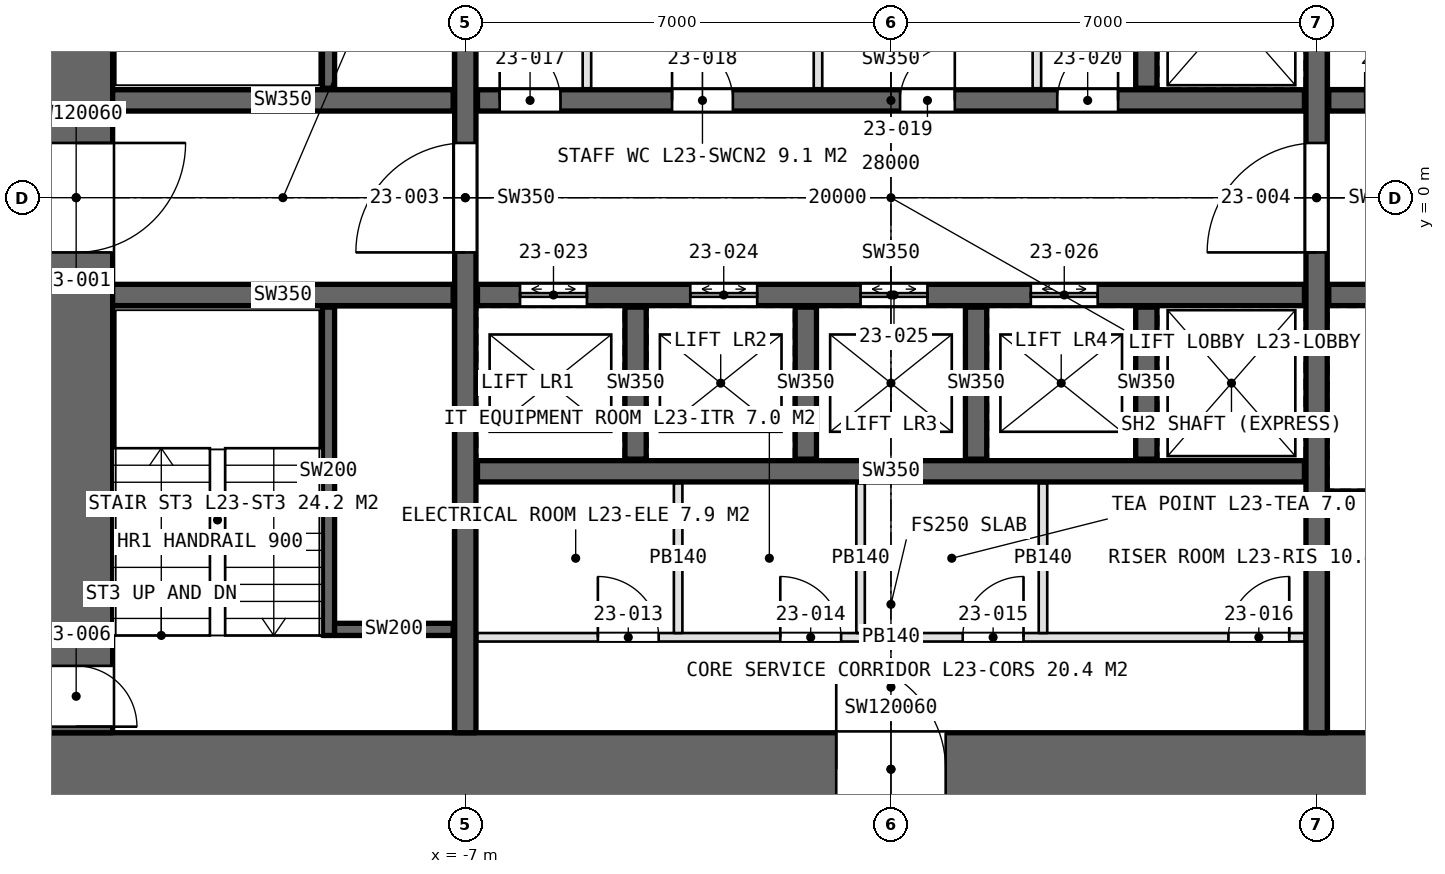
"""IFC4 building model, lengths in metres.
Left out: names, types, materials, properties, quantities, classifications, styles, units other than length and angle.
Written with IfcOpenShell. Run it as: python <this file> out.ifc"""

import sys

from ifc_helpers import new_model, si_unit, direction, frame, frame_2d, origin, place, context, subcontext, project, spatial, rectangle, extrude, element, fill, save


model = new_model("IFC4")
c1 = context("Model", 3, precision=1e-05, world=origin(), true_north=direction((0.0, 1.0)))
c2 = subcontext(c1, "Body", "Model", "MODEL_VIEW")
j1 = project(units=[si_unit("LENGTHUNIT", "METRE"), si_unit("PLANEANGLEUNIT", "RADIAN")], contexts=[c1])
p1 = place(None, origin())
s1 = spatial("IfcSite", under=j1, at=p1, CompositionType="ELEMENT")
p2 = place(p1, origin())
s2 = spatial("IfcBuilding", under=s1, at=p2, CompositionType="ELEMENT")
p3 = place(p2, frame((0.0, 0.0, 113.4)))
s3 = spatial("IfcBuildingStorey", under=s2, at=p3, CompositionType="ELEMENT", Elevation=113.4)
p4 = place(p3, frame((-14.0, -9.4, 0.0), z_axis=(0.0, 0.0, 1.0), x_axis=(1.0, 0.0, 0.0)))
e1 = element("IfcWall", 1, at=p4, inside=s3, PredefinedType="SHEAR", context=c2, shape_type="SweptSolid", body=[
    extrude(rectangle(XDim=28.0, YDim=1.2, at=frame_2d((14.0, 0.0))), origin(), (0.0, 0.0, 1.0), 4.2),
])
p5 = place(p4, frame((13.1, 0.0, 0.0)))
e2 = element("IfcOpeningElement", 2, at=p5, cuts=e1, PredefinedType="OPENING", context=c2, shape_type="SweptSolid", body=[
    extrude(rectangle(XDim=1.8, YDim=2.4, at=frame_2d((0.9, 1.2))), frame((0.0, 0.61, 0.0), z_axis=(0.0, -1.0, 0.0), x_axis=(1.0, 0.0, 0.0)), (0.0, 0.0, 1.0), 1.22),
])
p6 = place(p4, frame((22.9, 0.0, 0.0)))
e3 = element("IfcOpeningElement", 3, at=p6, cuts=e1, PredefinedType="OPENING", context=c2, shape_type="SweptSolid", body=[
    extrude(rectangle(XDim=2.2, YDim=2.7, at=frame_2d((1.1, 1.35))), frame((0.0, 0.61, 0.0), z_axis=(0.0, -1.0, 0.0), x_axis=(1.0, 0.0, 0.0)), (0.0, 0.0, 1.0), 1.22),
])
p7 = place(p3, frame((-13.4, 8.8, 0.0), z_axis=(0.0, 0.0, 1.0), x_axis=(0.0, -1.0, 0.0)))
e4 = element("IfcWall", 4, at=p7, inside=s3, PredefinedType="SHEAR", context=c2, shape_type="SweptSolid", body=[
    extrude(rectangle(XDim=17.6, YDim=1.2, at=frame_2d((8.8, 0.0))), origin(), (0.0, 0.0, 1.0), 4.2),
])
p8 = place(p7, frame((7.9, 0.0, 0.0)))
e5 = element("IfcOpeningElement", 5, at=p8, cuts=e4, PredefinedType="OPENING", context=c2, shape_type="SweptSolid", body=[
    extrude(rectangle(XDim=1.8, YDim=2.4, at=frame_2d((0.9, 1.2))), frame((0.0, 0.61, 0.0), z_axis=(0.0, -1.0, 0.0), x_axis=(1.0, 0.0, 0.0)), (0.0, 0.0, 1.0), 1.22),
])
p9 = place(p7, frame((16.5, 0.0, 0.0)))
e6 = element("IfcOpeningElement", 6, at=p9, cuts=e4, PredefinedType="OPENING", context=c2, shape_type="SweptSolid", body=[
    extrude(rectangle(XDim=1.0, YDim=2.4, at=frame_2d((0.5, 1.2))), frame((0.0, 0.61, 0.0), z_axis=(0.0, -1.0, 0.0), x_axis=(1.0, 0.0, 0.0)), (0.0, 0.0, 1.0), 1.22),
])
p10 = place(p3, frame((-7.0, -8.8, 0.0), z_axis=(0.0, 0.0, 1.0), x_axis=(0.0, 1.0, 0.0)))
e7 = element("IfcWall", 7, at=p10, inside=s3, PredefinedType="SHEAR", context=c2, shape_type="SweptSolid", body=[
    extrude(rectangle(XDim=17.6, YDim=0.35, at=frame_2d((8.8, 0.0))), origin(), (0.0, 0.0, 1.0), 4.2),
])
p11 = place(p10, frame((7.9, 0.0, 0.0)))
e8 = element("IfcOpeningElement", 8, at=p11, cuts=e7, PredefinedType="OPENING", context=c2, shape_type="SweptSolid", body=[
    extrude(rectangle(XDim=1.8, YDim=2.4, at=frame_2d((0.9, 1.2))), frame((0.0, 0.185, 0.0), z_axis=(0.0, -1.0, 0.0), x_axis=(1.0, 0.0, 0.0)), (0.0, 0.0, 1.0), 0.37),
])
p12 = place(p3, frame((7.0, -8.8, 0.0), z_axis=(0.0, 0.0, 1.0), x_axis=(0.0, 1.0, 0.0)))
e9 = element("IfcWall", 9, at=p12, inside=s3, PredefinedType="SHEAR", context=c2, shape_type="SweptSolid", body=[
    extrude(rectangle(XDim=17.6, YDim=0.35, at=frame_2d((8.8, 0.0))), origin(), (0.0, 0.0, 1.0), 4.2),
])
p13 = place(p12, frame((7.9, 0.0, 0.0)))
e10 = element("IfcOpeningElement", 10, at=p13, cuts=e9, PredefinedType="OPENING", context=c2, shape_type="SweptSolid", body=[
    extrude(rectangle(XDim=1.8, YDim=2.4, at=frame_2d((0.9, 1.2))), frame((0.0, 0.185, 0.0), z_axis=(0.0, -1.0, 0.0), x_axis=(1.0, 0.0, 0.0)), (0.0, 0.0, 1.0), 0.37),
])
p14 = place(p3, frame((-6.8, 1.6, 0.0), z_axis=(0.0, 0.0, 1.0), x_axis=(1.0, 0.0, 0.0)))
e11 = element("IfcWall", 11, at=p14, inside=s3, PredefinedType="SHEAR", context=c2, shape_type="SweptSolid", body=[
    extrude(rectangle(XDim=13.6, YDim=0.35, at=frame_2d((6.8, 0.0))), origin(), (0.0, 0.0, 1.0), 4.2),
])
p15 = place(p14, frame((0.365, 0.0, 0.0)))
e12 = element("IfcOpeningElement", 12, at=p15, cuts=e11, PredefinedType="OPENING", context=c2, shape_type="SweptSolid", body=[
    extrude(rectangle(XDim=1.0, YDim=2.4, at=frame_2d((0.5, 1.2))), frame((0.0, 0.185, 0.0), z_axis=(0.0, -1.0, 0.0), x_axis=(1.0, 0.0, 0.0)), (0.0, 0.0, 1.0), 0.37),
])
p16 = place(p14, frame((3.2, 0.0, 0.0)))
e13 = element("IfcOpeningElement", 13, at=p16, cuts=e11, PredefinedType="OPENING", context=c2, shape_type="SweptSolid", body=[
    extrude(rectangle(XDim=1.0, YDim=2.4, at=frame_2d((0.5, 1.2))), frame((0.0, 0.185, 0.0), z_axis=(0.0, -1.0, 0.0), x_axis=(1.0, 0.0, 0.0)), (0.0, 0.0, 1.0), 0.37),
])
p17 = place(p14, frame((6.95, 0.0, 0.0)))
e14 = element("IfcOpeningElement", 14, at=p17, cuts=e11, PredefinedType="OPENING", context=c2, shape_type="SweptSolid", body=[
    extrude(rectangle(XDim=0.9, YDim=2.4, at=frame_2d((0.45, 1.2))), frame((0.0, 0.185, 0.0), z_axis=(0.0, -1.0, 0.0), x_axis=(1.0, 0.0, 0.0)), (0.0, 0.0, 1.0), 0.37),
])
p18 = place(p14, frame((9.535, 0.0, 0.0)))
e15 = element("IfcOpeningElement", 15, at=p18, cuts=e11, PredefinedType="OPENING", context=c2, shape_type="SweptSolid", body=[
    extrude(rectangle(XDim=1.0, YDim=2.4, at=frame_2d((0.5, 1.2))), frame((0.0, 0.185, 0.0), z_axis=(0.0, -1.0, 0.0), x_axis=(1.0, 0.0, 0.0)), (0.0, 0.0, 1.0), 0.37),
])
p19 = place(p3, frame((-6.8, -1.6, 0.0), z_axis=(0.0, 0.0, 1.0), x_axis=(1.0, 0.0, 0.0)))
e16 = element("IfcWall", 16, at=p19, inside=s3, PredefinedType="SHEAR", context=c2, shape_type="SweptSolid", body=[
    extrude(rectangle(XDim=13.6, YDim=0.35, at=frame_2d((6.8, 0.0))), origin(), (0.0, 0.0, 1.0), 4.2),
])
p20 = place(p19, frame((0.7, 0.0, 0.0)))
e17 = element("IfcOpeningElement", 17, at=p20, cuts=e16, PredefinedType="OPENING", context=c2, shape_type="SweptSolid", body=[
    extrude(rectangle(XDim=1.1, YDim=2.4, at=frame_2d((0.55, 1.2))), frame((0.0, 0.185, 0.0), z_axis=(0.0, -1.0, 0.0), x_axis=(1.0, 0.0, 0.0)), (0.0, 0.0, 1.0), 0.37),
])
p21 = place(p19, frame((3.5, 0.0, 0.0)))
e18 = element("IfcOpeningElement", 18, at=p21, cuts=e16, PredefinedType="OPENING", context=c2, shape_type="SweptSolid", body=[
    extrude(rectangle(XDim=1.1, YDim=2.4, at=frame_2d((0.55, 1.2))), frame((0.0, 0.185, 0.0), z_axis=(0.0, -1.0, 0.0), x_axis=(1.0, 0.0, 0.0)), (0.0, 0.0, 1.0), 0.37),
])
p22 = place(p19, frame((6.3, 0.0, 0.0)))
e19 = element("IfcOpeningElement", 19, at=p22, cuts=e16, PredefinedType="OPENING", context=c2, shape_type="SweptSolid", body=[
    extrude(rectangle(XDim=1.1, YDim=2.4, at=frame_2d((0.55, 1.2))), frame((0.0, 0.185, 0.0), z_axis=(0.0, -1.0, 0.0), x_axis=(1.0, 0.0, 0.0)), (0.0, 0.0, 1.0), 0.37),
])
p23 = place(p19, frame((9.1, 0.0, 0.0)))
e20 = element("IfcOpeningElement", 20, at=p23, cuts=e16, PredefinedType="OPENING", context=c2, shape_type="SweptSolid", body=[
    extrude(rectangle(XDim=1.1, YDim=2.4, at=frame_2d((0.55, 1.2))), frame((0.0, 0.185, 0.0), z_axis=(0.0, -1.0, 0.0), x_axis=(1.0, 0.0, 0.0)), (0.0, 0.0, 1.0), 0.37),
])
p24 = place(p3, frame((-6.8, -4.5, 0.0), z_axis=(0.0, 0.0, 1.0), x_axis=(1.0, 0.0, 0.0)))
e21 = element("IfcWall", 21, at=p24, inside=s3, PredefinedType="SHEAR", context=c2, shape_type="SweptSolid", body=[
    extrude(rectangle(XDim=13.6, YDim=0.35, at=frame_2d((6.8, 0.0))), origin(), (0.0, 0.0, 1.0), 4.2),
])
for number, where, z_axis, x_axis in (
    (22, (-12.8, 1.6, 0.0), (0.0, 0.0, 1.0), (1.0, 0.0, 0.0)),
    (23, (-12.8, -1.6, 0.0), (0.0, 0.0, 1.0), (1.0, 0.0, 0.0)),
):
    element("IfcWall", number, at=place(p3, frame(where, z_axis=z_axis, x_axis=x_axis)), inside=s3, PredefinedType="SHEAR", context=c2, shape_type="SweptSolid", body=[
        extrude(rectangle(XDim=5.6, YDim=0.35, at=frame_2d((2.8, 0.0))), origin(), (0.0, 0.0, 1.0), 4.2),
    ])
p25 = place(p3, frame((7.2, 1.6, 0.0), z_axis=(0.0, 0.0, 1.0), x_axis=(1.0, 0.0, 0.0)))
e24 = element("IfcWall", 24, at=p25, inside=s3, PredefinedType="SHEAR", context=c2, shape_type="SweptSolid", body=[
    extrude(rectangle(XDim=5.6, YDim=0.35, at=frame_2d((2.8, 0.0))), origin(), (0.0, 0.0, 1.0), 4.2),
])
p26 = place(p25, frame((0.6, 0.0, 0.0)))
e25 = element("IfcOpeningElement", 25, at=p26, cuts=e24, PredefinedType="OPENING", context=c2, shape_type="SweptSolid", body=[
    extrude(rectangle(XDim=1.0, YDim=2.4, at=frame_2d((0.5, 1.2))), frame((0.0, 0.185, 0.0), z_axis=(0.0, -1.0, 0.0), x_axis=(1.0, 0.0, 0.0)), (0.0, 0.0, 1.0), 0.37),
])
p27 = place(p3, frame((7.2, -1.6, 0.0), z_axis=(0.0, 0.0, 1.0), x_axis=(1.0, 0.0, 0.0)))
e26 = element("IfcWall", 26, at=p27, inside=s3, PredefinedType="SHEAR", context=c2, shape_type="SweptSolid", body=[
    extrude(rectangle(XDim=5.6, YDim=0.35, at=frame_2d((2.8, 0.0))), origin(), (0.0, 0.0, 1.0), 4.2),
])
p28 = place(p27, frame((0.9, 0.0, 0.0)))
e27 = element("IfcOpeningElement", 27, at=p28, cuts=e26, PredefinedType="OPENING", context=c2, shape_type="SweptSolid", body=[
    extrude(rectangle(XDim=1.3, YDim=2.4, at=frame_2d((0.65, 1.2))), frame((0.0, 0.185, 0.0), z_axis=(0.0, -1.0, 0.0), x_axis=(1.0, 0.0, 0.0)), (0.0, 0.0, 1.0), 0.37),
])
p29 = place(p27, frame((3.9, 0.0, 0.0)))
e28 = element("IfcOpeningElement", 28, at=p29, cuts=e26, PredefinedType="OPENING", context=c2, shape_type="SweptSolid", body=[
    extrude(rectangle(XDim=1.3, YDim=2.4, at=frame_2d((0.65, 1.2))), frame((0.0, 0.185, 0.0), z_axis=(0.0, -1.0, 0.0), x_axis=(1.0, 0.0, 0.0)), (0.0, 0.0, 1.0), 0.37),
])
p30 = place(p3, frame((7.2, -5.0, 0.0), z_axis=(0.0, 0.0, 1.0), x_axis=(1.0, 0.0, 0.0)))
e29 = element("IfcWall", 29, at=p30, inside=s3, PredefinedType="SHEAR", context=c2, shape_type="SweptSolid", body=[
    extrude(rectangle(XDim=5.6, YDim=0.35, at=frame_2d((2.8, 0.0))), origin(), (0.0, 0.0, 1.0), 4.2),
])
for number, where, z_axis, x_axis in (
    (30, (-4.2, -4.3, 0.0), (0.0, 0.0, 1.0), (0.0, 1.0, 0.0)),
    (31, (-1.4, -4.3, 0.0), (0.0, 0.0, 1.0), (0.0, 1.0, 0.0)),
    (32, (1.4, -4.3, 0.0), (0.0, 0.0, 1.0), (0.0, 1.0, 0.0)),
    (33, (4.2, 1.8, 0.0), (0.0, 0.0, 1.0), (0.0, 1.0, 0.0)),
    (34, (4.2, -4.3, 0.0), (0.0, 0.0, 1.0), (0.0, 1.0, 0.0)),
):
    element("IfcWall", number, at=place(p3, frame(where, z_axis=z_axis, x_axis=x_axis)), inside=s3, PredefinedType="SHEAR", context=c2, shape_type="SweptSolid", body=[
        extrude(rectangle(XDim=2.5, YDim=0.35, at=frame_2d((1.25, 0.0))), origin(), (0.0, 0.0, 1.0), 4.2),
    ])
p31 = place(p3, frame((-6.8, -7.23, 0.0), z_axis=(0.0, 0.0, 1.0), x_axis=(1.0, 0.0, 0.0)))
e35 = element("IfcWall", 35, at=p31, inside=s3, PredefinedType="PARTITIONING", context=c2, shape_type="SweptSolid", body=[
    extrude(rectangle(XDim=13.6, YDim=0.14, at=frame_2d((6.8, 0.0))), origin(), (0.0, 0.0, 1.0), 3.95),
])
p32 = place(p31, frame((1.98, 0.0, 0.0)))
e36 = element("IfcOpeningElement", 36, at=p32, cuts=e35, PredefinedType="OPENING", context=c2, shape_type="SweptSolid", body=[
    extrude(rectangle(XDim=1.0, YDim=2.4, at=frame_2d((0.5, 1.2))), frame((0.0, 0.08, 0.0), z_axis=(0.0, -1.0, 0.0), x_axis=(1.0, 0.0, 0.0)), (0.0, 0.0, 1.0), 0.16),
])
p33 = place(p31, frame((4.98, 0.0, 0.0)))
e37 = element("IfcOpeningElement", 37, at=p33, cuts=e35, PredefinedType="OPENING", context=c2, shape_type="SweptSolid", body=[
    extrude(rectangle(XDim=1.0, YDim=2.4, at=frame_2d((0.5, 1.2))), frame((0.0, 0.08, 0.0), z_axis=(0.0, -1.0, 0.0), x_axis=(1.0, 0.0, 0.0)), (0.0, 0.0, 1.0), 0.16),
])
p34 = place(p31, frame((7.98, 0.0, 0.0)))
e38 = element("IfcOpeningElement", 38, at=p34, cuts=e35, PredefinedType="OPENING", context=c2, shape_type="SweptSolid", body=[
    extrude(rectangle(XDim=1.0, YDim=2.4, at=frame_2d((0.5, 1.2))), frame((0.0, 0.08, 0.0), z_axis=(0.0, -1.0, 0.0), x_axis=(1.0, 0.0, 0.0)), (0.0, 0.0, 1.0), 0.16),
])
p35 = place(p31, frame((12.35, 0.0, 0.0)))
e39 = element("IfcOpeningElement", 39, at=p35, cuts=e35, PredefinedType="OPENING", context=c2, shape_type="SweptSolid", body=[
    extrude(rectangle(XDim=1.0, YDim=2.4, at=frame_2d((0.5, 1.2))), frame((0.0, 0.08, 0.0), z_axis=(0.0, -1.0, 0.0), x_axis=(1.0, 0.0, 0.0)), (0.0, 0.0, 1.0), 0.16),
])
for number, where, z_axis, x_axis in (
    (40, (-3.5, -4.7, 0.0), (0.0, 0.0, 1.0), (0.0, -1.0, 0.0)),
    (41, (-0.5, -4.7, 0.0), (0.0, 0.0, 1.0), (0.0, -1.0, 0.0)),
    (42, (2.5, -4.7, 0.0), (0.0, 0.0, 1.0), (0.0, -1.0, 0.0)),
):
    element("IfcWall", number, at=place(p3, frame(where, z_axis=z_axis, x_axis=x_axis)), inside=s3, PredefinedType="PARTITIONING", context=c2, shape_type="SweptSolid", body=[
        extrude(rectangle(XDim=2.46, YDim=0.14, at=frame_2d((1.23, 0.0))), origin(), (0.0, 0.0, 1.0), 3.95),
    ])
for number, where, z_axis, x_axis in (
    (43, (-5.0, 1.8, 0.0), (0.0, 0.0, 1.0), (0.0, 1.0, 0.0)),
    (44, (-1.2, 1.8, 0.0), (0.0, 0.0, 1.0), (0.0, 1.0, 0.0)),
    (45, (2.4, 1.8, 0.0), (0.0, 0.0, 1.0), (0.0, 1.0, 0.0)),
):
    element("IfcWall", number, at=place(p3, frame(where, z_axis=z_axis, x_axis=x_axis)), inside=s3, PredefinedType="PARTITIONING", context=c2, shape_type="SweptSolid", body=[
        extrude(rectangle(XDim=2.5, YDim=0.14, at=frame_2d((1.25, 0.0))), origin(), (0.0, 0.0, 1.0), 3.95),
    ])
for number, where, z_axis, x_axis in (
    (46, (-9.25, 7.2, 0.0), (0.0, 0.0, 1.0), (0.0, -1.0, 0.0)),
    (47, (-9.25, -7.2, 0.0), (0.0, 0.0, 1.0), (0.0, 1.0, 0.0)),
):
    element("IfcWall", number, at=place(p3, frame(where, z_axis=z_axis, x_axis=x_axis)), inside=s3, PredefinedType="SOLIDWALL", context=c2, shape_type="SweptSolid", body=[
        extrude(rectangle(XDim=5.4, YDim=0.2, at=frame_2d((2.7, 0.0))), origin(), (0.0, 0.0, 1.0), 4.2),
    ])
p36 = place(p3, frame((-9.15, -7.1, 0.0), z_axis=(0.0, 0.0, 1.0), x_axis=(1.0, 0.0, 0.0)))
e48 = element("IfcWall", 48, at=p36, inside=s3, PredefinedType="SOLIDWALL", context=c2, shape_type="SweptSolid", body=[
    extrude(rectangle(XDim=1.95, YDim=0.2, at=frame_2d((0.975, 0.0))), origin(), (0.0, 0.0, 1.0), 4.2),
])
p37 = place(p8, origin())
e49 = element("IfcDoor", 49, at=p37, inside=s3, OperationType="DOUBLE_DOOR_SINGLE_SWING", PredefinedType="DOOR", context=c2, shape_type="SweptSolid", body=[
    extrude(rectangle(XDim=1.8, YDim=2.4, at=frame_2d((0.9, 1.2))), frame((0.0, 0.025, 0.0), z_axis=(0.0, -1.0, 0.0), x_axis=(1.0, 0.0, 0.0)), (0.0, 0.0, 1.0), 0.05),
])
fill(e5, e49)
p38 = place(p11, origin())
e50 = element("IfcDoor", 50, at=p38, inside=s3, OperationType="DOUBLE_DOOR_SINGLE_SWING", PredefinedType="DOOR", context=c2, shape_type="SweptSolid", body=[
    extrude(rectangle(XDim=1.8, YDim=2.4, at=frame_2d((0.9, 1.2))), frame((0.0, 0.025, 0.0), z_axis=(0.0, -1.0, 0.0), x_axis=(1.0, 0.0, 0.0)), (0.0, 0.0, 1.0), 0.05),
])
fill(e8, e50)
p39 = place(p13, origin())
e51 = element("IfcDoor", 51, at=p39, inside=s3, OperationType="DOUBLE_DOOR_SINGLE_SWING", PredefinedType="DOOR", context=c2, shape_type="SweptSolid", body=[
    extrude(rectangle(XDim=1.8, YDim=2.4, at=frame_2d((0.9, 1.2))), frame((0.0, 0.025, 0.0), z_axis=(0.0, -1.0, 0.0), x_axis=(1.0, 0.0, 0.0)), (0.0, 0.0, 1.0), 0.05),
])
fill(e10, e51)
p40 = place(p9, origin())
e52 = element("IfcDoor", 52, at=p40, inside=s3, OperationType="SINGLE_SWING_RIGHT", PredefinedType="DOOR", context=c2, shape_type="SweptSolid", body=[
    extrude(rectangle(XDim=1.0, YDim=2.4, at=frame_2d((0.5, 1.2))), frame((0.0, 0.025, 0.0), z_axis=(0.0, -1.0, 0.0), x_axis=(1.0, 0.0, 0.0)), (0.0, 0.0, 1.0), 0.05),
])
fill(e6, e52)
p41 = place(p32, origin())
e53 = element("IfcDoor", 53, at=p41, inside=s3, OperationType="SINGLE_SWING_LEFT", PredefinedType="DOOR", context=c2, shape_type="SweptSolid", body=[
    extrude(rectangle(XDim=1.0, YDim=2.4, at=frame_2d((0.5, 1.2))), frame((0.0, 0.025, 0.0), z_axis=(0.0, -1.0, 0.0), x_axis=(1.0, 0.0, 0.0)), (0.0, 0.0, 1.0), 0.05),
])
fill(e36, e53)
p42 = place(p33, origin())
e54 = element("IfcDoor", 54, at=p42, inside=s3, OperationType="SINGLE_SWING_LEFT", PredefinedType="DOOR", context=c2, shape_type="SweptSolid", body=[
    extrude(rectangle(XDim=1.0, YDim=2.4, at=frame_2d((0.5, 1.2))), frame((0.0, 0.025, 0.0), z_axis=(0.0, -1.0, 0.0), x_axis=(1.0, 0.0, 0.0)), (0.0, 0.0, 1.0), 0.05),
])
fill(e37, e54)
p43 = place(p34, origin())
e55 = element("IfcDoor", 55, at=p43, inside=s3, OperationType="SINGLE_SWING_RIGHT", PredefinedType="DOOR", context=c2, shape_type="SweptSolid", body=[
    extrude(rectangle(XDim=1.0, YDim=2.4, at=frame_2d((0.5, 1.2))), frame((0.0, 0.025, 0.0), z_axis=(0.0, -1.0, 0.0), x_axis=(1.0, 0.0, 0.0)), (0.0, 0.0, 1.0), 0.05),
])
fill(e38, e55)
p44 = place(p35, origin())
e56 = element("IfcDoor", 56, at=p44, inside=s3, OperationType="SINGLE_SWING_RIGHT", PredefinedType="DOOR", context=c2, shape_type="SweptSolid", body=[
    extrude(rectangle(XDim=1.0, YDim=2.4, at=frame_2d((0.5, 1.2))), frame((0.0, 0.025, 0.0), z_axis=(0.0, -1.0, 0.0), x_axis=(1.0, 0.0, 0.0)), (0.0, 0.0, 1.0), 0.05),
])
fill(e39, e56)
p45 = place(p15, origin())
e57 = element("IfcDoor", 57, at=p45, inside=s3, OperationType="SINGLE_SWING_LEFT", PredefinedType="DOOR", context=c2, shape_type="SweptSolid", body=[
    extrude(rectangle(XDim=1.0, YDim=2.4, at=frame_2d((0.5, 1.2))), frame((0.0, 0.025, 0.0), z_axis=(0.0, -1.0, 0.0), x_axis=(1.0, 0.0, 0.0)), (0.0, 0.0, 1.0), 0.05),
])
fill(e12, e57)
p46 = place(p16, origin())
e58 = element("IfcDoor", 58, at=p46, inside=s3, OperationType="SINGLE_SWING_LEFT", PredefinedType="DOOR", context=c2, shape_type="SweptSolid", body=[
    extrude(rectangle(XDim=1.0, YDim=2.4, at=frame_2d((0.5, 1.2))), frame((0.0, 0.025, 0.0), z_axis=(0.0, -1.0, 0.0), x_axis=(1.0, 0.0, 0.0)), (0.0, 0.0, 1.0), 0.05),
])
fill(e13, e58)
p47 = place(p17, origin())
e59 = element("IfcDoor", 59, at=p47, inside=s3, OperationType="SINGLE_SWING_RIGHT", PredefinedType="DOOR", context=c2, shape_type="SweptSolid", body=[
    extrude(rectangle(XDim=0.9, YDim=2.4, at=frame_2d((0.45, 1.2))), frame((0.0, 0.025, 0.0), z_axis=(0.0, -1.0, 0.0), x_axis=(1.0, 0.0, 0.0)), (0.0, 0.0, 1.0), 0.05),
])
fill(e14, e59)
p48 = place(p18, origin())
e60 = element("IfcDoor", 60, at=p48, inside=s3, OperationType="SINGLE_SWING_RIGHT", PredefinedType="DOOR", context=c2, shape_type="SweptSolid", body=[
    extrude(rectangle(XDim=1.0, YDim=2.4, at=frame_2d((0.5, 1.2))), frame((0.0, 0.025, 0.0), z_axis=(0.0, -1.0, 0.0), x_axis=(1.0, 0.0, 0.0)), (0.0, 0.0, 1.0), 0.05),
])
fill(e15, e60)
p49 = place(p5, origin())
e61 = element("IfcDoor", 61, at=p49, inside=s3, OperationType="DOUBLE_DOOR_SINGLE_SWING", PredefinedType="DOOR", context=c2, shape_type="SweptSolid", body=[
    extrude(rectangle(XDim=1.8, YDim=2.4, at=frame_2d((0.9, 1.2))), frame((0.0, 0.025, 0.0), z_axis=(0.0, -1.0, 0.0), x_axis=(1.0, 0.0, 0.0)), (0.0, 0.0, 1.0), 0.05),
])
fill(e2, e61)
p50 = place(p20, origin())
e62 = element("IfcDoor", 62, at=p50, inside=s3, OperationType="DOUBLE_DOOR_SLIDING", PredefinedType="DOOR", context=c2, shape_type="SweptSolid", body=[
    extrude(rectangle(XDim=1.1, YDim=2.4, at=frame_2d((0.55, 1.2))), frame((0.0, 0.025, 0.0), z_axis=(0.0, -1.0, 0.0), x_axis=(1.0, 0.0, 0.0)), (0.0, 0.0, 1.0), 0.05),
])
fill(e17, e62)
p51 = place(p21, origin())
e63 = element("IfcDoor", 63, at=p51, inside=s3, OperationType="DOUBLE_DOOR_SLIDING", PredefinedType="DOOR", context=c2, shape_type="SweptSolid", body=[
    extrude(rectangle(XDim=1.1, YDim=2.4, at=frame_2d((0.55, 1.2))), frame((0.0, 0.025, 0.0), z_axis=(0.0, -1.0, 0.0), x_axis=(1.0, 0.0, 0.0)), (0.0, 0.0, 1.0), 0.05),
])
fill(e18, e63)
p52 = place(p22, origin())
e64 = element("IfcDoor", 64, at=p52, inside=s3, OperationType="DOUBLE_DOOR_SLIDING", PredefinedType="DOOR", context=c2, shape_type="SweptSolid", body=[
    extrude(rectangle(XDim=1.1, YDim=2.4, at=frame_2d((0.55, 1.2))), frame((0.0, 0.025, 0.0), z_axis=(0.0, -1.0, 0.0), x_axis=(1.0, 0.0, 0.0)), (0.0, 0.0, 1.0), 0.05),
])
fill(e19, e64)
p53 = place(p23, origin())
e65 = element("IfcDoor", 65, at=p53, inside=s3, OperationType="DOUBLE_DOOR_SLIDING", PredefinedType="DOOR", context=c2, shape_type="SweptSolid", body=[
    extrude(rectangle(XDim=1.1, YDim=2.4, at=frame_2d((0.55, 1.2))), frame((0.0, 0.025, 0.0), z_axis=(0.0, -1.0, 0.0), x_axis=(1.0, 0.0, 0.0)), (0.0, 0.0, 1.0), 0.05),
])
fill(e20, e65)
save(model, sys.argv[1])
